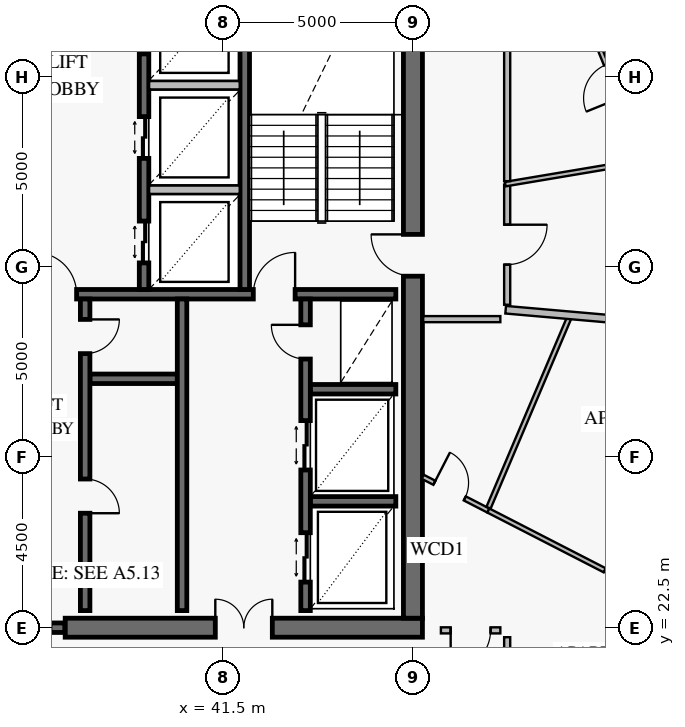
"""IFC4 building model, lengths in metres.
Left out: names, types, materials, properties, quantities, classifications, styles, units other than length and angle.
Written with IfcOpenShell. Run it as: python <this file> out.ifc"""

import sys

from ifc_helpers import new_model, si_unit, direction, frame, frame_2d, origin, place, context, subcontext, project, spatial, rectangle, extrude, element, fill, save


model = new_model("IFC4")
c1 = context("Model", 3, precision=1e-05, world=origin(), true_north=direction((0.0, 1.0)))
c2 = subcontext(c1, "Body", "Model", "MODEL_VIEW")
j1 = project(units=[si_unit("LENGTHUNIT", "METRE"), si_unit("PLANEANGLEUNIT", "RADIAN")], contexts=[c1])
p1 = place(None, origin())
s1 = spatial("IfcSite", under=j1, at=p1, CompositionType="ELEMENT")
p2 = place(p1, origin())
s2 = spatial("IfcBuilding", under=s1, at=p2, CompositionType="ELEMENT")
p3 = place(p2, frame((0.0, 0.0, 319.6)))
s3 = spatial("IfcBuildingStorey", under=s2, at=p3, CompositionType="ELEMENT", Elevation=319.6)
p4 = place(p3, frame((37.35, 22.5, 0.0), z_axis=(0.0, 0.0, 1.0), x_axis=(1.0, 0.0, 0.0)))
e1 = element("IfcWall", 1, at=p4, inside=s3, PredefinedType="SHEAR", context=c2, shape_type="SweptSolid", body=[
    extrude(rectangle(XDim=9.4, YDim=0.5, at=frame_2d((4.7, 0.0))), origin(), (0.0, 0.0, 1.0), 3.8),
])
p5 = place(p4, frame((3.95, 0.0, 0.0)))
e2 = element("IfcOpeningElement", 2, at=p5, cuts=e1, PredefinedType="OPENING", context=c2, shape_type="SweptSolid", body=[
    extrude(rectangle(XDim=1.5, YDim=2.15, at=frame_2d((0.75, 1.075))), frame((0.0, 0.262, 0.0), z_axis=(0.0, -1.0, 0.0), x_axis=(1.0, 0.0, 0.0)), (0.0, 0.0, 1.0), 0.524),
])
p6 = place(p3, frame((46.5, 22.75, 0.0), z_axis=(0.0, 0.0, 1.0), x_axis=(0.0, 1.0, 0.0)))
e3 = element("IfcWall", 3, at=p6, inside=s3, PredefinedType="SHEAR", context=c2, shape_type="SweptSolid", body=[
    extrude(rectangle(XDim=18.5, YDim=0.5, at=frame_2d((9.25, 0.0))), origin(), (0.0, 0.0, 1.0), 3.8),
])
p7 = place(p6, frame((9.0, 0.0, 0.0)))
e4 = element("IfcOpeningElement", 4, at=p7, cuts=e3, PredefinedType="OPENING", context=c2, shape_type="SweptSolid", body=[
    extrude(rectangle(XDim=1.1, YDim=2.15, at=frame_2d((0.55, 1.075))), frame((0.0, 0.262, 0.0), z_axis=(0.0, -1.0, 0.0), x_axis=(1.0, 0.0, 0.0)), (0.0, 0.0, 1.0), 0.524),
])
p8 = place(p3, frame((35.06, 22.5, 0.0), z_axis=(0.0, 0.0, 1.0), x_axis=(1.0, 0.0, 0.0)))
e5 = element("IfcWall", 5, at=p8, inside=s3, PredefinedType="SOLIDWALL", context=c2, shape_type="SweptSolid", body=[
    extrude(rectangle(XDim=2.28, YDim=0.25, at=frame_2d((1.14, 0.0))), origin(), (0.0, 0.0, 1.0), 3.8),
])
p9 = place(p8, frame((0.39, 0.0, 0.0)))
e6 = element("IfcOpeningElement", 6, at=p9, cuts=e5, PredefinedType="OPENING", context=c2, shape_type="SweptSolid", body=[
    extrude(rectangle(XDim=1.5, YDim=2.15, at=frame_2d((0.75, 1.075))), frame((0.0, 0.137, 0.0), z_axis=(0.0, -1.0, 0.0), x_axis=(1.0, 0.0, 0.0)), (0.0, 0.0, 1.0), 0.274),
])
p10 = place(p3, frame((25.95, 31.275, 0.0), z_axis=(0.0, 0.0, 1.0), x_axis=(1.0, 0.0, 0.0)))
e7 = element("IfcWall", 7, at=p10, inside=s3, PredefinedType="SOLIDWALL", context=c2, shape_type="SweptSolid", body=[
    extrude(rectangle(XDim=20.1, YDim=0.25, at=frame_2d((10.05, 0.0))), origin(), (0.0, 0.0, 1.0), 3.8),
])
p11 = place(p10, frame((2.6, 0.0, 0.0)))
e8 = element("IfcOpeningElement", 8, at=p11, cuts=e7, PredefinedType="OPENING", context=c2, shape_type="SweptSolid", body=[
    extrude(rectangle(XDim=1.1, YDim=2.15, at=frame_2d((0.55, 1.075))), frame((0.0, 0.137, 0.0), z_axis=(0.0, -1.0, 0.0), x_axis=(1.0, 0.0, 0.0)), (0.0, 0.0, 1.0), 0.274),
])
p12 = place(p10, frame((10.6, 0.0, 0.0)))
e9 = element("IfcOpeningElement", 9, at=p12, cuts=e7, PredefinedType="OPENING", context=c2, shape_type="SweptSolid", body=[
    extrude(rectangle(XDim=1.1, YDim=2.15, at=frame_2d((0.55, 1.075))), frame((0.0, 0.137, 0.0), z_axis=(0.0, -1.0, 0.0), x_axis=(1.0, 0.0, 0.0)), (0.0, 0.0, 1.0), 0.274),
])
p13 = place(p10, frame((16.35, 0.0, 0.0)))
e10 = element("IfcOpeningElement", 10, at=p13, cuts=e7, PredefinedType="OPENING", context=c2, shape_type="SweptSolid", body=[
    extrude(rectangle(XDim=1.1, YDim=2.15, at=frame_2d((0.55, 1.075))), frame((0.0, 0.137, 0.0), z_axis=(0.0, -1.0, 0.0), x_axis=(1.0, 0.0, 0.0)), (0.0, 0.0, 1.0), 0.274),
])
p14 = place(p3, frame((42.075, 31.4, 0.0), z_axis=(0.0, 0.0, 1.0), x_axis=(0.0, 1.0, 0.0)))
e11 = element("IfcWall", 11, at=p14, inside=s3, PredefinedType="SOLIDWALL", context=c2, shape_type="SweptSolid", body=[
    extrude(rectangle(XDim=9.7, YDim=0.25, at=frame_2d((4.85, 0.0))), origin(), (0.0, 0.0, 1.0), 3.8),
])
p15 = place(p3, frame((39.425, 31.4, 0.0), z_axis=(0.0, 0.0, 1.0), x_axis=(0.0, 1.0, 0.0)))
e12 = element("IfcWall", 12, at=p15, inside=s3, PredefinedType="SOLIDWALL", context=c2, shape_type="SweptSolid", body=[
    extrude(rectangle(XDim=9.65, YDim=0.25, at=frame_2d((4.825, 0.0))), origin(), (0.0, 0.0, 1.0), 3.8),
])
p16 = place(p15, frame((0.7, 0.0, 0.0)))
e13 = element("IfcOpeningElement", 13, at=p16, cuts=e12, PredefinedType="OPENING", context=c2, shape_type="SweptSolid", body=[
    extrude(rectangle(XDim=1.1, YDim=2.2, at=frame_2d((0.55, 1.1))), frame((0.0, 0.137, 0.0), z_axis=(0.0, -1.0, 0.0), x_axis=(1.0, 0.0, 0.0)), (0.0, 0.0, 1.0), 0.274),
])
p17 = place(p15, frame((3.45, 0.0, 0.0)))
e14 = element("IfcOpeningElement", 14, at=p17, cuts=e12, PredefinedType="OPENING", context=c2, shape_type="SweptSolid", body=[
    extrude(rectangle(XDim=1.1, YDim=2.2, at=frame_2d((0.55, 1.1))), frame((0.0, 0.137, 0.0), z_axis=(0.0, -1.0, 0.0), x_axis=(1.0, 0.0, 0.0)), (0.0, 0.0, 1.0), 0.274),
])
p18 = place(p15, frame((6.2, 0.0, 0.0)))
e15 = element("IfcOpeningElement", 15, at=p18, cuts=e12, PredefinedType="OPENING", context=c2, shape_type="SweptSolid", body=[
    extrude(rectangle(XDim=1.1, YDim=2.2, at=frame_2d((0.55, 1.1))), frame((0.0, 0.137, 0.0), z_axis=(0.0, -1.0, 0.0), x_axis=(1.0, 0.0, 0.0)), (0.0, 0.0, 1.0), 0.274),
])
p19 = place(p15, frame((8.47, 0.0, 0.0)))
e16 = element("IfcOpeningElement", 16, at=p19, cuts=e12, PredefinedType="OPENING", context=c2, shape_type="SweptSolid", body=[
    extrude(rectangle(XDim=0.9, YDim=2.1, at=frame_2d((0.45, 1.05))), frame((0.0, 0.137, 0.0), z_axis=(0.0, -1.0, 0.0), x_axis=(1.0, 0.0, 0.0)), (0.0, 0.0, 1.0), 0.274),
])
p20 = place(p3, frame((38.0, 29.05, 0.0), z_axis=(0.0, 0.0, 1.0), x_axis=(1.0, 0.0, 0.0)))
e17 = element("IfcWall", 17, at=p20, inside=s3, PredefinedType="SOLIDWALL", context=c2, shape_type="SweptSolid", body=[
    extrude(rectangle(XDim=2.3, YDim=0.25, at=frame_2d((1.15, 0.0))), origin(), (0.0, 0.0, 1.0), 3.8),
])
p21 = place(p3, frame((37.875, 22.95, 0.0), z_axis=(0.0, 0.0, 1.0), x_axis=(0.0, 1.0, 0.0)))
e18 = element("IfcWall", 18, at=p21, inside=s3, PredefinedType="SOLIDWALL", context=c2, shape_type="SweptSolid", body=[
    extrude(rectangle(XDim=8.2, YDim=0.25, at=frame_2d((4.1, 0.0))), origin(), (0.0, 0.0, 1.0), 3.8),
])
p22 = place(p21, frame((2.562, 0.0, 0.0)))
e19 = element("IfcOpeningElement", 19, at=p22, cuts=e18, PredefinedType="OPENING", context=c2, shape_type="SweptSolid", body=[
    extrude(rectangle(XDim=0.9, YDim=2.1, at=frame_2d((0.45, 1.05))), frame((0.0, 0.137, 0.0), z_axis=(0.0, -1.0, 0.0), x_axis=(1.0, 0.0, 0.0)), (0.0, 0.0, 1.0), 0.274),
])
p23 = place(p21, frame((6.762, 0.0, 0.0)))
e20 = element("IfcOpeningElement", 20, at=p23, cuts=e18, PredefinedType="OPENING", context=c2, shape_type="SweptSolid", body=[
    extrude(rectangle(XDim=0.9, YDim=2.1, at=frame_2d((0.45, 1.05))), frame((0.0, 0.137, 0.0), z_axis=(0.0, -1.0, 0.0), x_axis=(1.0, 0.0, 0.0)), (0.0, 0.0, 1.0), 0.274),
])
p24 = place(p3, frame((40.425, 22.95, 0.0), z_axis=(0.0, 0.0, 1.0), x_axis=(0.0, 1.0, 0.0)))
e21 = element("IfcWall", 21, at=p24, inside=s3, PredefinedType="SOLIDWALL", context=c2, shape_type="SweptSolid", body=[
    extrude(rectangle(XDim=8.2, YDim=0.25, at=frame_2d((4.1, 0.0))), origin(), (0.0, 0.0, 1.0), 3.8),
])
for number, where, z_axis, x_axis in (
    (22, (43.8, 25.825, 0.0), (0.0, 0.0, 1.0), (1.0, 0.0, 0.0)),
    (23, (43.8, 28.775, 0.0), (0.0, 0.0, 1.0), (1.0, 0.0, 0.0)),
):
    element("IfcWall", number, at=place(p3, frame(where, z_axis=z_axis, x_axis=x_axis)), inside=s3, PredefinedType="SOLIDWALL", context=c2, shape_type="SweptSolid", body=[
        extrude(rectangle(XDim=2.25, YDim=0.25, at=frame_2d((1.125, 0.0))), origin(), (0.0, 0.0, 1.0), 3.8),
    ])
p25 = place(p3, frame((43.675, 22.95, 0.0), z_axis=(0.0, 0.0, 1.0), x_axis=(0.0, 1.0, 0.0)))
e24 = element("IfcWall", 24, at=p25, inside=s3, PredefinedType="SOLIDWALL", context=c2, shape_type="SweptSolid", body=[
    extrude(rectangle(XDim=8.2, YDim=0.25, at=frame_2d((4.1, 0.0))), origin(), (0.0, 0.0, 1.0), 3.8),
])
p26 = place(p25, frame((0.75, 0.0, 0.0)))
e25 = element("IfcOpeningElement", 25, at=p26, cuts=e24, PredefinedType="OPENING", context=c2, shape_type="SweptSolid", body=[
    extrude(rectangle(XDim=1.3, YDim=2.3, at=frame_2d((0.65, 1.15))), frame((0.0, 0.137, 0.0), z_axis=(0.0, -1.0, 0.0), x_axis=(1.0, 0.0, 0.0)), (0.0, 0.0, 1.0), 0.274),
])
p27 = place(p25, frame((3.7, 0.0, 0.0)))
e26 = element("IfcOpeningElement", 26, at=p27, cuts=e24, PredefinedType="OPENING", context=c2, shape_type="SweptSolid", body=[
    extrude(rectangle(XDim=1.3, YDim=2.3, at=frame_2d((0.65, 1.15))), frame((0.0, 0.137, 0.0), z_axis=(0.0, -1.0, 0.0), x_axis=(1.0, 0.0, 0.0)), (0.0, 0.0, 1.0), 0.274),
])
p28 = place(p25, frame((6.62, 0.0, 0.0)))
e27 = element("IfcOpeningElement", 27, at=p28, cuts=e24, PredefinedType="OPENING", context=c2, shape_type="SweptSolid", body=[
    extrude(rectangle(XDim=0.9, YDim=2.1, at=frame_2d((0.45, 1.05))), frame((0.0, 0.137, 0.0), z_axis=(0.0, -1.0, 0.0), x_axis=(1.0, 0.0, 0.0)), (0.0, 0.0, 1.0), 0.274),
])
p29 = place(p3, frame((46.758, 26.471, 0.0), z_axis=(0.0, 0.0, 1.0), x_axis=(0.889392970677, -0.457143460755, 0.0)))
e28 = element("IfcWall", 28, at=p29, inside=s3, PredefinedType="PARTITIONING", context=c2, shape_type="SweptSolid", body=[
    extrude(rectangle(XDim=1.942, YDim=0.12, at=frame_2d((0.971, 0.0))), origin(), (0.0, 0.0, 1.0), 3.55),
])
p30 = place(p29, frame((0.344, 0.0, 0.0)))
e29 = element("IfcOpeningElement", 29, at=p30, cuts=e28, PredefinedType="OPENING", context=c2, shape_type="SweptSolid", body=[
    extrude(rectangle(XDim=0.9, YDim=2.1, at=frame_2d((0.45, 1.05))), frame((0.0, 0.072, 0.0), z_axis=(0.0, -1.0, 0.0), x_axis=(1.0, 0.0, 0.0)), (0.0, 0.0, 1.0), 0.144),
])
p31 = place(p3, frame((48.485, 25.583, 0.0), z_axis=(0.0, 0.0, 1.0), x_axis=(0.889425539597, -0.457080090917, 0.0)))
e30 = element("IfcWall", 30, at=p31, inside=s3, PredefinedType="PARTITIONING", context=c2, shape_type="SweptSolid", body=[
    extrude(rectangle(XDim=7.886, YDim=0.12, at=frame_2d((3.943, 0.0))), origin(), (0.0, 0.0, 1.0), 3.2),
])
p32 = place(p31, frame((3.443, 0.0, 0.0)))
e31 = element("IfcOpeningElement", 31, at=p32, cuts=e30, PredefinedType="OPENING", context=c2, shape_type="SweptSolid", body=[
    extrude(rectangle(XDim=0.95, YDim=2.1, at=frame_2d((0.475, 1.05))), frame((0.0, 0.072, 0.0), z_axis=(0.0, -1.0, 0.0), x_axis=(1.0, 0.0, 0.0)), (0.0, 0.0, 1.0), 0.144),
])
p33 = place(p3, frame((48.8, 22.43, 0.0), z_axis=(0.0, 0.0, 1.0), x_axis=(-1.0, 0.0, 0.0)))
e32 = element("IfcWall", 32, at=p33, inside=s3, PredefinedType="PARTITIONING", context=c2, shape_type="SweptSolid", body=[
    extrude(rectangle(XDim=1.564, YDim=0.16, at=frame_2d((0.782, 0.0))), origin(), (0.0, 0.0, 1.0), 3.55),
])
p34 = place(p33, frame((0.257, 0.0, 0.0)))
e33 = element("IfcOpeningElement", 33, at=p34, cuts=e32, PredefinedType="OPENING", context=c2, shape_type="SweptSolid", body=[
    extrude(rectangle(XDim=1.05, YDim=2.15, at=frame_2d((0.525, 1.075))), frame((0.0, 0.092, 0.0), z_axis=(0.0, -1.0, 0.0), x_axis=(1.0, 0.0, 0.0)), (0.0, 0.0, 1.0), 0.184),
])
p35 = place(p3, frame((52.644, 34.696, 0.0), z_axis=(0.0, 0.0, 1.0), x_axis=(-0.374926411414, 0.927054575537, 0.0)))
e34 = element("IfcWall", 34, at=p35, inside=s3, PredefinedType="PARTITIONING", context=c2, shape_type="SweptSolid", body=[
    extrude(rectangle(XDim=7.483, YDim=0.12, at=frame_2d((3.741, 0.0))), origin(), (0.0, 0.0, 1.0), 3.0),
])
p36 = place(p35, frame((1.877, 0.0, 0.0)))
e35 = element("IfcOpeningElement", 35, at=p36, cuts=e34, PredefinedType="OPENING", context=c2, shape_type="SweptSolid", body=[
    extrude(rectangle(XDim=0.95, YDim=2.1, at=frame_2d((0.475, 1.05))), frame((0.0, 0.072, 0.0), z_axis=(0.0, -1.0, 0.0), x_axis=(1.0, 0.0, 0.0)), (0.0, 0.0, 1.0), 0.144),
])
p37 = place(p35, frame((5.541, 0.0, 0.0)))
e36 = element("IfcOpeningElement", 36, at=p37, cuts=e34, PredefinedType="OPENING", context=c2, shape_type="SweptSolid", body=[
    extrude(rectangle(XDim=0.9, YDim=2.1, at=frame_2d((0.45, 1.05))), frame((0.0, 0.072, 0.0), z_axis=(0.0, -1.0, 0.0), x_axis=(1.0, 0.0, 0.0)), (0.0, 0.0, 1.0), 0.144),
])
p38 = place(p3, frame((54.179, 34.954, 0.0), z_axis=(0.0, 0.0, 1.0), x_axis=(-0.374928779354, 0.927053617873, 0.0)))
e37 = element("IfcWall", 37, at=p38, inside=s3, PredefinedType="PARTITIONING", context=c2, shape_type="SweptSolid", body=[
    extrude(rectangle(XDim=8.155, YDim=0.12, at=frame_2d((4.078, 0.0))), origin(), (0.0, 0.0, 1.0), 3.0),
])
p39 = place(p38, frame((1.614, 0.0, 0.0)))
e38 = element("IfcOpeningElement", 38, at=p39, cuts=e37, PredefinedType="OPENING", context=c2, shape_type="SweptSolid", body=[
    extrude(rectangle(XDim=0.95, YDim=2.1, at=frame_2d((0.475, 1.05))), frame((0.0, 0.072, 0.0), z_axis=(0.0, -1.0, 0.0), x_axis=(1.0, 0.0, 0.0)), (0.0, 0.0, 1.0), 0.144),
])
p40 = place(p38, frame((5.592, 0.0, 0.0)))
e39 = element("IfcOpeningElement", 39, at=p40, cuts=e37, PredefinedType="OPENING", context=c2, shape_type="SweptSolid", body=[
    extrude(rectangle(XDim=0.95, YDim=2.1, at=frame_2d((0.475, 1.05))), frame((0.0, 0.072, 0.0), z_axis=(0.0, -1.0, 0.0), x_axis=(1.0, 0.0, 0.0)), (0.0, 0.0, 1.0), 0.144),
])
p41 = place(p3, frame((48.98, 30.999, 0.0), z_axis=(0.0, 0.0, 1.0), x_axis=(0.0, 1.0, 0.0)))
e40 = element("IfcWall", 40, at=p41, inside=s3, PredefinedType="PARTITIONING", context=c2, shape_type="SweptSolid", body=[
    extrude(rectangle(XDim=3.163, YDim=0.16, at=frame_2d((1.581, 0.0))), origin(), (0.0, 0.0, 1.0), 3.55),
])
p42 = place(p41, frame((1.056, 0.0, 0.0)))
e41 = element("IfcOpeningElement", 41, at=p42, cuts=e40, PredefinedType="OPENING", context=c2, shape_type="SweptSolid", body=[
    extrude(rectangle(XDim=1.05, YDim=2.15, at=frame_2d((0.525, 1.075))), frame((0.0, 0.092, 0.0), z_axis=(0.0, -1.0, 0.0), x_axis=(1.0, 0.0, 0.0)), (0.0, 0.0, 1.0), 0.184),
])
for number, where, z_axis, x_axis in (
    (42, (39.558, 34.025, 0.0), (0.0, 0.0, 1.0), (1.0, 0.0, 0.0)),
    (43, (39.558, 36.775, 0.0), (0.0, 0.0, 1.0), (1.0, 0.0, 0.0)),
):
    element("IfcWall", number, at=place(p3, frame(where, z_axis=z_axis, x_axis=x_axis)), inside=s3, PredefinedType="PARTITIONING", context=c2, shape_type="SweptSolid", body=[
        extrude(rectangle(XDim=2.384, YDim=0.22, at=frame_2d((1.192, 0.0))), origin(), (0.0, 0.0, 1.0), 3.55),
    ])
p43 = place(p3, frame((48.49, 25.658, 0.0), z_axis=(0.0, 0.0, 1.0), x_axis=(0.390765351484, 0.920490325902, 0.0)))
e44 = element("IfcWall", 44, at=p43, inside=s3, PredefinedType="PARTITIONING", context=c2, shape_type="SweptSolid", body=[
    extrude(rectangle(XDim=5.469, YDim=0.12, at=frame_2d((2.735, 0.0))), origin(), (0.0, 0.0, 1.0), 3.0),
])
p44 = place(p3, frame((48.94, 30.868, 0.0), z_axis=(0.0, 0.0, 1.0), x_axis=(0.996194010343, -0.087163603397, 0.0)))
e45 = element("IfcWall", 45, at=p44, inside=s3, PredefinedType="PARTITIONING", context=c2, shape_type="SweptSolid", body=[
    extrude(rectangle(XDim=13.573, YDim=0.2, at=frame_2d((6.787, 0.0))), origin(), (0.0, 0.0, 1.0), 2.97),
])
p45 = place(p3, frame((48.93, 34.173, 0.0), z_axis=(0.0, 0.0, 1.0), x_axis=(0.986167473013, 0.165751968828, 0.0)))
e46 = element("IfcWall", 46, at=p45, inside=s3, PredefinedType="PARTITIONING", context=c2, shape_type="SweptSolid", body=[
    extrude(rectangle(XDim=3.657, YDim=0.12, at=frame_2d((1.829, 0.0))), origin(), (0.0, 0.0, 1.0), 3.55),
])
p46 = place(p3, frame((48.98, 20.94, 0.0), z_axis=(0.0, 0.0, 1.0), x_axis=(0.0, 1.0, 0.0)))
e47 = element("IfcWall", 47, at=p46, inside=s3, PredefinedType="PARTITIONING", context=c2, shape_type="SweptSolid", body=[
    extrude(rectangle(XDim=1.31, YDim=0.16, at=frame_2d((0.655, 0.0))), origin(), (0.0, 0.0, 1.0), 3.55),
])
p47 = place(p3, frame((46.77, 30.62, 0.0), z_axis=(0.0, 0.0, 1.0), x_axis=(1.0, 0.0, 0.0)))
e48 = element("IfcWall", 48, at=p47, inside=s3, PredefinedType="PARTITIONING", context=c2, shape_type="SweptSolid", body=[
    extrude(rectangle(XDim=2.03, YDim=0.16, at=frame_2d((1.015, 0.0))), origin(), (0.0, 0.0, 1.0), 3.55),
])
p48 = place(p3, frame((48.98, 34.25, 0.0), z_axis=(0.0, 0.0, 1.0), x_axis=(0.0, 1.0, 0.0)))
e49 = element("IfcWall", 49, at=p48, inside=s3, PredefinedType="PARTITIONING", context=c2, shape_type="SweptSolid", body=[
    extrude(rectangle(XDim=3.731, YDim=0.16, at=frame_2d((1.866, 0.0))), origin(), (0.0, 0.0, 1.0), 3.0),
])
p49 = place(p7, origin())
e50 = element("IfcDoor", 50, at=p49, inside=s3, OperationType="SINGLE_SWING_RIGHT", PredefinedType="USERDEFINED", context=c2, shape_type="SweptSolid", body=[
    extrude(rectangle(XDim=1.1, YDim=2.15, at=frame_2d((0.55, 1.075))), frame((0.0, 0.025, 0.0), z_axis=(0.0, -1.0, 0.0), x_axis=(1.0, 0.0, 0.0)), (0.0, 0.0, 1.0), 0.05),
])
fill(e4, e50)
p50 = place(p5, origin())
e51 = element("IfcDoor", 51, at=p50, inside=s3, OperationType="DOUBLE_DOOR_SINGLE_SWING", PredefinedType="DOOR", context=c2, shape_type="SweptSolid", body=[
    extrude(rectangle(XDim=1.5, YDim=2.15, at=frame_2d((0.75, 1.075))), frame((0.0, 0.025, 0.0), z_axis=(0.0, -1.0, 0.0), x_axis=(1.0, 0.0, 0.0)), (0.0, 0.0, 1.0), 0.05),
])
fill(e2, e51)
p51 = place(p12, origin())
e52 = element("IfcDoor", 52, at=p51, inside=s3, OperationType="SINGLE_SWING_LEFT", PredefinedType="USERDEFINED", context=c2, shape_type="SweptSolid", body=[
    extrude(rectangle(XDim=1.1, YDim=2.15, at=frame_2d((0.55, 1.075))), frame((0.0, 0.025, 0.0), z_axis=(0.0, -1.0, 0.0), x_axis=(1.0, 0.0, 0.0)), (0.0, 0.0, 1.0), 0.05),
])
fill(e9, e52)
p52 = place(p13, origin())
e53 = element("IfcDoor", 53, at=p52, inside=s3, OperationType="SINGLE_SWING_RIGHT", PredefinedType="USERDEFINED", context=c2, shape_type="SweptSolid", body=[
    extrude(rectangle(XDim=1.1, YDim=2.15, at=frame_2d((0.55, 1.075))), frame((0.0, 0.025, 0.0), z_axis=(0.0, -1.0, 0.0), x_axis=(1.0, 0.0, 0.0)), (0.0, 0.0, 1.0), 0.05),
])
fill(e10, e53)
p53 = place(p16, origin())
e54 = element("IfcDoor", 54, at=p53, inside=s3, OperationType="DOUBLE_DOOR_SLIDING", PredefinedType="DOOR", context=c2, shape_type="SweptSolid", body=[
    extrude(rectangle(XDim=1.1, YDim=2.2, at=frame_2d((0.55, 1.1))), frame((0.0, 0.025, 0.0), z_axis=(0.0, -1.0, 0.0), x_axis=(1.0, 0.0, 0.0)), (0.0, 0.0, 1.0), 0.05),
])
fill(e13, e54)
p54 = place(p17, origin())
e55 = element("IfcDoor", 55, at=p54, inside=s3, OperationType="DOUBLE_DOOR_SLIDING", PredefinedType="DOOR", context=c2, shape_type="SweptSolid", body=[
    extrude(rectangle(XDim=1.1, YDim=2.2, at=frame_2d((0.55, 1.1))), frame((0.0, 0.025, 0.0), z_axis=(0.0, -1.0, 0.0), x_axis=(1.0, 0.0, 0.0)), (0.0, 0.0, 1.0), 0.05),
])
fill(e14, e55)
p55 = place(p18, origin())
e56 = element("IfcDoor", 56, at=p55, inside=s3, OperationType="DOUBLE_DOOR_SLIDING", PredefinedType="DOOR", context=c2, shape_type="SweptSolid", body=[
    extrude(rectangle(XDim=1.1, YDim=2.2, at=frame_2d((0.55, 1.1))), frame((0.0, 0.025, 0.0), z_axis=(0.0, -1.0, 0.0), x_axis=(1.0, 0.0, 0.0)), (0.0, 0.0, 1.0), 0.05),
])
fill(e15, e56)
p56 = place(p22, frame((0.9, 0.0, 0.0), z_axis=(0.0, 0.0, 1.0), x_axis=(-1.0, 0.0, 0.0)))
e57 = element("IfcDoor", 57, at=p56, inside=s3, OperationType="SINGLE_SWING_RIGHT", PredefinedType="DOOR", context=c2, shape_type="SweptSolid", body=[
    extrude(rectangle(XDim=0.9, YDim=2.1, at=frame_2d((0.45, 1.05))), frame((0.0, 0.025, 0.0), z_axis=(0.0, -1.0, 0.0), x_axis=(1.0, 0.0, 0.0)), (0.0, 0.0, 1.0), 0.05),
])
fill(e19, e57)
p57 = place(p23, frame((0.9, 0.0, 0.0), z_axis=(0.0, 0.0, 1.0), x_axis=(-1.0, 0.0, 0.0)))
e58 = element("IfcDoor", 58, at=p57, inside=s3, OperationType="SINGLE_SWING_LEFT", PredefinedType="DOOR", context=c2, shape_type="SweptSolid", body=[
    extrude(rectangle(XDim=0.9, YDim=2.1, at=frame_2d((0.45, 1.05))), frame((0.0, 0.025, 0.0), z_axis=(0.0, -1.0, 0.0), x_axis=(1.0, 0.0, 0.0)), (0.0, 0.0, 1.0), 0.05),
])
fill(e20, e58)
p58 = place(p26, origin())
e59 = element("IfcDoor", 59, at=p58, inside=s3, OperationType="DOUBLE_DOOR_SLIDING", PredefinedType="DOOR", context=c2, shape_type="SweptSolid", body=[
    extrude(rectangle(XDim=1.3, YDim=2.3, at=frame_2d((0.65, 1.15))), frame((0.0, 0.025, 0.0), z_axis=(0.0, -1.0, 0.0), x_axis=(1.0, 0.0, 0.0)), (0.0, 0.0, 1.0), 0.05),
])
fill(e25, e59)
p59 = place(p27, origin())
e60 = element("IfcDoor", 60, at=p59, inside=s3, OperationType="DOUBLE_DOOR_SLIDING", PredefinedType="DOOR", context=c2, shape_type="SweptSolid", body=[
    extrude(rectangle(XDim=1.3, YDim=2.3, at=frame_2d((0.65, 1.15))), frame((0.0, 0.025, 0.0), z_axis=(0.0, -1.0, 0.0), x_axis=(1.0, 0.0, 0.0)), (0.0, 0.0, 1.0), 0.05),
])
fill(e26, e60)
p60 = place(p28, origin())
e61 = element("IfcDoor", 61, at=p60, inside=s3, OperationType="SINGLE_SWING_RIGHT", PredefinedType="DOOR", context=c2, shape_type="SweptSolid", body=[
    extrude(rectangle(XDim=0.9, YDim=2.1, at=frame_2d((0.45, 1.05))), frame((0.0, 0.025, 0.0), z_axis=(0.0, -1.0, 0.0), x_axis=(1.0, 0.0, 0.0)), (0.0, 0.0, 1.0), 0.05),
])
fill(e27, e61)
p61 = place(p30, origin())
e62 = element("IfcDoor", 62, at=p61, inside=s3, OperationType="SINGLE_SWING_LEFT", PredefinedType="DOOR", context=c2, shape_type="SweptSolid", body=[
    extrude(rectangle(XDim=0.9, YDim=2.1, at=frame_2d((0.45, 1.05))), frame((0.0, 0.025, 0.0), z_axis=(0.0, -1.0, 0.0), x_axis=(1.0, 0.0, 0.0)), (0.0, 0.0, 1.0), 0.05),
])
fill(e29, e62)
p62 = place(p32, origin())
e63 = element("IfcDoor", 63, at=p62, inside=s3, OperationType="SINGLE_SWING_RIGHT", PredefinedType="DOOR", context=c2, shape_type="SweptSolid", body=[
    extrude(rectangle(XDim=0.95, YDim=2.1, at=frame_2d((0.475, 1.05))), frame((0.0, 0.025, 0.0), z_axis=(0.0, -1.0, 0.0), x_axis=(1.0, 0.0, 0.0)), (0.0, 0.0, 1.0), 0.05),
])
fill(e31, e63)
p63 = place(p34, origin())
e64 = element("IfcDoor", 64, at=p63, inside=s3, OperationType="SINGLE_SWING_RIGHT", PredefinedType="DOOR", context=c2, shape_type="SweptSolid", body=[
    extrude(rectangle(XDim=1.05, YDim=2.15, at=frame_2d((0.525, 1.075))), frame((0.0, 0.025, 0.0), z_axis=(0.0, -1.0, 0.0), x_axis=(1.0, 0.0, 0.0)), (0.0, 0.0, 1.0), 0.05),
])
fill(e33, e64)
p64 = place(p42, frame((1.05, 0.0, 0.0), z_axis=(0.0, 0.0, 1.0), x_axis=(-1.0, 0.0, 0.0)))
e65 = element("IfcDoor", 65, at=p64, inside=s3, OperationType="SINGLE_SWING_LEFT", PredefinedType="DOOR", context=c2, shape_type="SweptSolid", body=[
    extrude(rectangle(XDim=1.05, YDim=2.15, at=frame_2d((0.525, 1.075))), frame((0.0, 0.025, 0.0), z_axis=(0.0, -1.0, 0.0), x_axis=(1.0, 0.0, 0.0)), (0.0, 0.0, 1.0), 0.05),
])
fill(e41, e65)
save(model, sys.argv[1])
